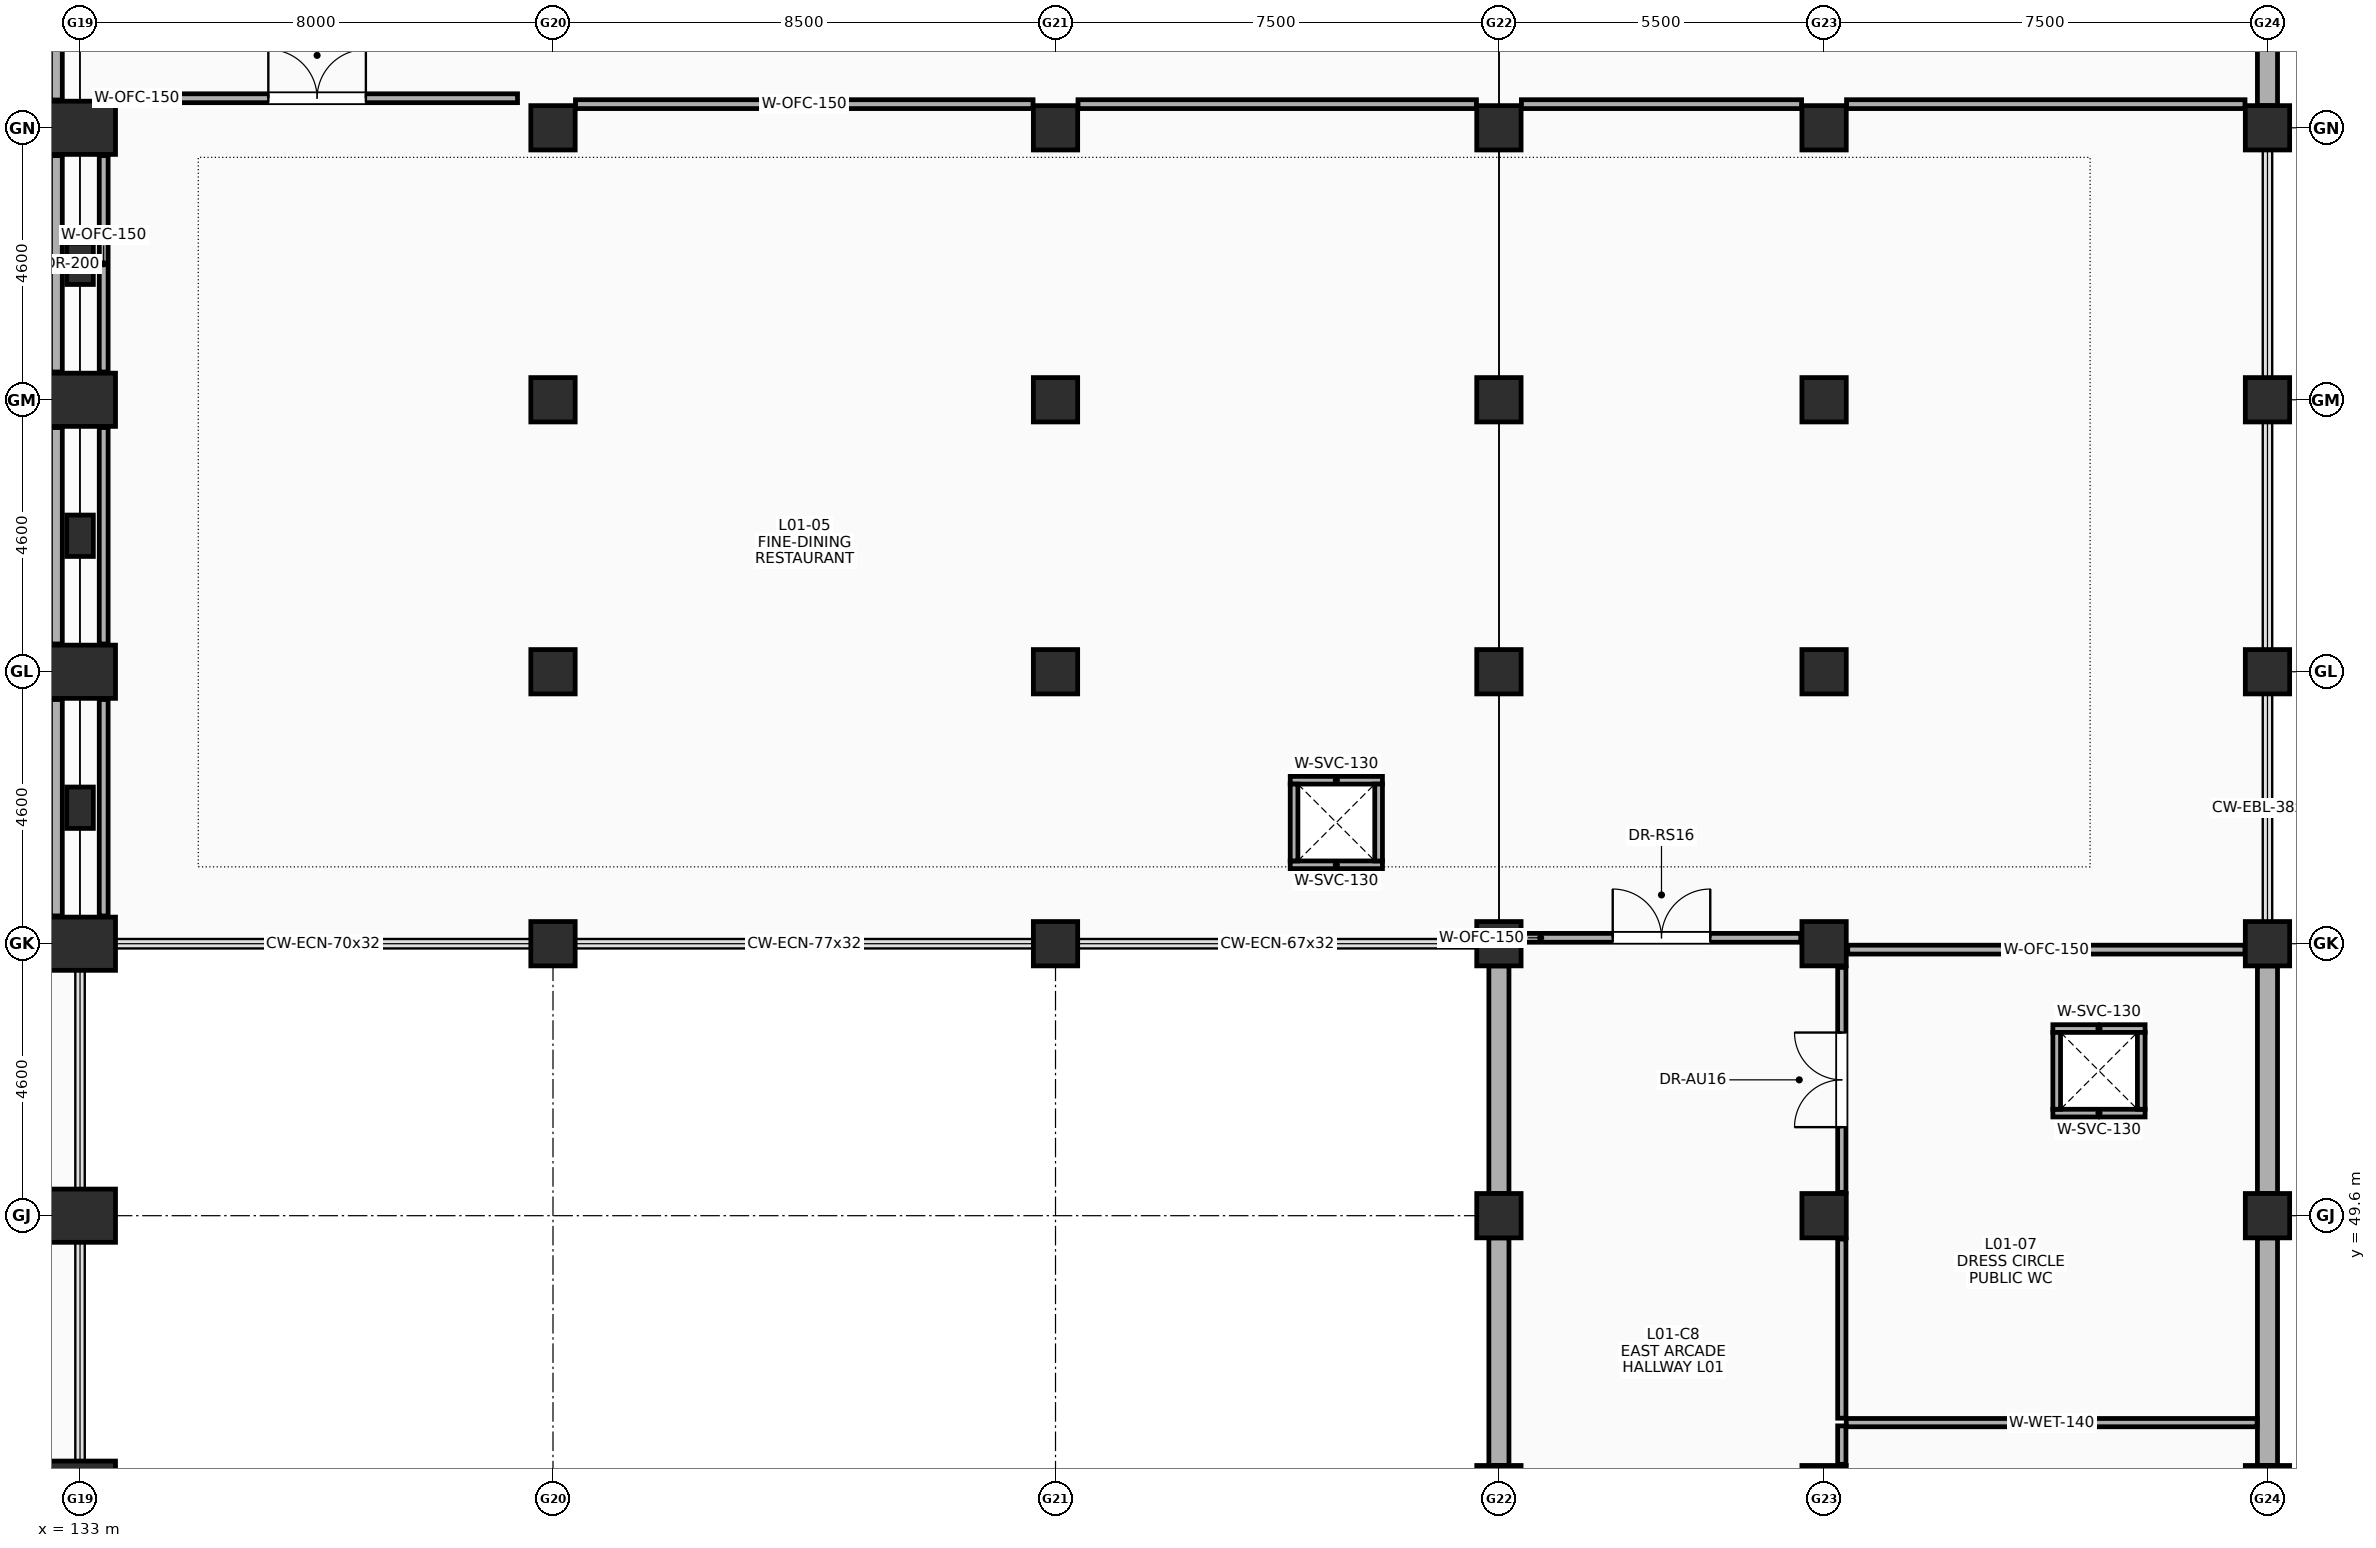
"""IFC4 building model, lengths in metres.
Left out: names, types, materials, properties, quantities, classifications, styles, units other than length and angle.
Written with IfcOpenShell. Run it as: python <this file> out.ifc"""

import sys

from ifc_helpers import new_model, si_unit, direction, frame, frame_2d, origin, origin_2d, place, context, subcontext, project, spatial, rectangle, extrude, element, fill, save


model = new_model("IFC4")
c1 = context("Model", 3, precision=1e-05, world=origin(), true_north=direction((0.0, 1.0)))
c2 = subcontext(c1, "Body", "Model", "MODEL_VIEW")
j1 = project(units=[si_unit("LENGTHUNIT", "METRE"), si_unit("PLANEANGLEUNIT", "RADIAN")], contexts=[c1])
p1 = place(None, origin())
s1 = spatial("IfcSite", under=j1, at=p1, CompositionType="ELEMENT")
p2 = place(p1, origin())
s2 = spatial("IfcBuilding", under=s1, at=p2, CompositionType="ELEMENT")
p3 = place(p2, frame((0.0, 0.0, 5.4)))
s3 = spatial("IfcBuildingStorey", under=s2, at=p3, CompositionType="ELEMENT", Elevation=5.4)
for number, where, z_axis, x_axis in (
    (1, (133.0, 45.0, 0.0), (0.0, 0.0, 1.0), (1.0, 0.0, 0.0)),
    (2, (133.0, 49.6, 0.0), (0.0, 0.0, 1.0), (1.0, 0.0, 0.0)),
    (3, (133.0, 54.2, 0.0), (0.0, 0.0, 1.0), (1.0, 0.0, 0.0)),
    (4, (133.0, 58.8, 0.0), (0.0, 0.0, 1.0), (1.0, 0.0, 0.0)),
    (5, (133.0, 63.4, 0.0), (0.0, 0.0, 1.0), (1.0, 0.0, 0.0)),
    (6, (133.0, 68.0, 0.0), (0.0, 0.0, 1.0), (1.0, 0.0, 0.0)),
):
    element("IfcColumn", number, at=place(p3, frame(where, z_axis=z_axis, x_axis=x_axis)), inside=s3, PredefinedType="COLUMN", context=c2, shape_type="SweptSolid", body=[
        extrude(rectangle(XDim=1.2, YDim=0.9, at=origin_2d()), origin(), (0.0, 0.0, 1.0), 4.4),
    ])
for number, where, z_axis, x_axis in (
    (7, (141.0, 54.2, 0.0), (0.0, 0.0, 1.0), (1.0, 0.0, 0.0)),
    (8, (141.0, 58.8, 0.0), (0.0, 0.0, 1.0), (1.0, 0.0, 0.0)),
    (9, (141.0, 63.4, 0.0), (0.0, 0.0, 1.0), (1.0, 0.0, 0.0)),
    (10, (141.0, 68.0, 0.0), (0.0, 0.0, 1.0), (1.0, 0.0, 0.0)),
    (11, (149.5, 54.2, 0.0), (0.0, 0.0, 1.0), (1.0, 0.0, 0.0)),
    (12, (149.5, 58.8, 0.0), (0.0, 0.0, 1.0), (1.0, 0.0, 0.0)),
    (13, (149.5, 63.4, 0.0), (0.0, 0.0, 1.0), (1.0, 0.0, 0.0)),
    (14, (149.5, 68.0, 0.0), (0.0, 0.0, 1.0), (1.0, 0.0, 0.0)),
    (15, (157.0, 45.0, 0.0), (0.0, 0.0, 1.0), (1.0, 0.0, 0.0)),
    (16, (157.0, 49.6, 0.0), (0.0, 0.0, 1.0), (1.0, 0.0, 0.0)),
    (17, (157.0, 54.2, 0.0), (0.0, 0.0, 1.0), (1.0, 0.0, 0.0)),
    (18, (157.0, 58.8, 0.0), (0.0, 0.0, 1.0), (1.0, 0.0, 0.0)),
    (19, (157.0, 63.4, 0.0), (0.0, 0.0, 1.0), (1.0, 0.0, 0.0)),
    (20, (157.0, 68.0, 0.0), (0.0, 0.0, 1.0), (1.0, 0.0, 0.0)),
    (21, (162.5, 45.0, 0.0), (0.0, 0.0, 1.0), (1.0, 0.0, 0.0)),
    (22, (162.5, 49.6, 0.0), (0.0, 0.0, 1.0), (1.0, 0.0, 0.0)),
    (23, (162.5, 54.2, 0.0), (0.0, 0.0, 1.0), (1.0, 0.0, 0.0)),
    (24, (162.5, 58.8, 0.0), (0.0, 0.0, 1.0), (1.0, 0.0, 0.0)),
    (25, (162.5, 63.4, 0.0), (0.0, 0.0, 1.0), (1.0, 0.0, 0.0)),
    (26, (162.5, 68.0, 0.0), (0.0, 0.0, 1.0), (1.0, 0.0, 0.0)),
    (27, (170.0, 45.0, 0.0), (0.0, 0.0, 1.0), (1.0, 0.0, 0.0)),
    (28, (170.0, 49.6, 0.0), (0.0, 0.0, 1.0), (1.0, 0.0, 0.0)),
    (29, (170.0, 54.2, 0.0), (0.0, 0.0, 1.0), (1.0, 0.0, 0.0)),
    (30, (170.0, 58.8, 0.0), (0.0, 0.0, 1.0), (1.0, 0.0, 0.0)),
    (31, (170.0, 63.4, 0.0), (0.0, 0.0, 1.0), (1.0, 0.0, 0.0)),
    (32, (170.0, 68.0, 0.0), (0.0, 0.0, 1.0), (1.0, 0.0, 0.0)),
):
    element("IfcColumn", number, at=place(p3, frame(where, z_axis=z_axis, x_axis=x_axis)), inside=s3, PredefinedType="COLUMN", context=c2, shape_type="SweptSolid", body=[
        extrude(rectangle(XDim=0.75, YDim=0.75, at=origin_2d()), origin(), (0.0, 0.0, 1.0), 4.4),
    ])
for number, where, z_axis, x_axis in (
    (33, (133.0, 56.5, 0.0), (0.0, 0.0, 1.0), (1.0, 0.0, 0.0)),
    (34, (133.0, 61.1, 0.0), (0.0, 0.0, 1.0), (1.0, 0.0, 0.0)),
    (35, (133.0, 65.7, 0.0), (0.0, 0.0, 1.0), (1.0, 0.0, 0.0)),
):
    element("IfcColumn", number, at=place(p3, frame(where, z_axis=z_axis, x_axis=x_axis)), inside=s3, PredefinedType="PILASTER", context=c2, shape_type="SweptSolid", body=[
        extrude(rectangle(XDim=0.45, YDim=0.7, at=origin_2d()), origin(), (0.0, 0.0, 1.0), 4.4),
    ])
p4 = place(p3, frame((170.0, 45.375, 0.0), z_axis=(0.0, 0.0, 1.0), x_axis=(0.0, 1.0, 0.0)))
e36 = element("IfcWall", 36, at=p4, inside=s3, PredefinedType="SOLIDWALL", context=c2, shape_type="SweptSolid", body=[
    extrude(rectangle(XDim=3.85, YDim=0.34, at=frame_2d((1.925, 0.0))), origin(), (0.0, 0.0, 1.0), 3.2),
])
p5 = place(p3, frame((170.0, 49.975, 0.0), z_axis=(0.0, 0.0, 1.0), x_axis=(0.0, 1.0, 0.0)))
e37 = element("IfcWall", 37, at=p5, inside=s3, PredefinedType="SOLIDWALL", context=c2, shape_type="SweptSolid", body=[
    extrude(rectangle(XDim=3.85, YDim=0.34, at=frame_2d((1.925, 0.0))), origin(), (0.0, 0.0, 1.0), 3.2),
])
for number, where, z_axis, x_axis in (
    (38, (170.0, 68.375, 0.0), (0.0, 0.0, 1.0), (0.0, 1.0, 0.0)),
    (39, (157.0, 45.375, 0.0), (0.0, 0.0, 1.0), (0.0, 1.0, 0.0)),
):
    element("IfcWall", number, at=place(p3, frame(where, z_axis=z_axis, x_axis=x_axis)), inside=s3, PredefinedType="SOLIDWALL", context=c2, shape_type="SweptSolid", body=[
        extrude(rectangle(XDim=3.85, YDim=0.34, at=frame_2d((1.925, 0.0))), origin(), (0.0, 0.0, 1.0), 3.2),
    ])
p6 = place(p3, frame((157.0, 49.975, 0.0), z_axis=(0.0, 0.0, 1.0), x_axis=(0.0, 1.0, 0.0)))
e40 = element("IfcWall", 40, at=p6, inside=s3, PredefinedType="SOLIDWALL", context=c2, shape_type="SweptSolid", body=[
    extrude(rectangle(XDim=3.85, YDim=0.34, at=frame_2d((1.925, 0.0))), origin(), (0.0, 0.0, 1.0), 3.2),
])
for number, where, z_axis, x_axis in (
    (41, (166.37, 51.335, 0.0), (0.0, 0.0, 1.0), (1.0, 0.0, 0.0)),
    (42, (166.37, 52.765, 0.0), (0.0, 0.0, 1.0), (1.0, 0.0, 0.0)),
):
    element("IfcWall", number, at=place(p3, frame(where, z_axis=z_axis, x_axis=x_axis)), inside=s3, PredefinedType="PARTITIONING", context=c2, shape_type="SweptSolid", body=[
        extrude(rectangle(XDim=1.56, YDim=0.13, at=frame_2d((0.78, 0.0))), origin(), (0.0, 0.0, 1.0), 4.02),
    ])
for number, where, z_axis, x_axis in (
    (43, (166.435, 51.4, 0.0), (0.0, 0.0, 1.0), (0.0, 1.0, 0.0)),
    (44, (167.865, 51.4, 0.0), (0.0, 0.0, 1.0), (0.0, 1.0, 0.0)),
):
    element("IfcWall", number, at=place(p3, frame(where, z_axis=z_axis, x_axis=x_axis)), inside=s3, PredefinedType="PARTITIONING", context=c2, shape_type="SweptSolid", body=[
        extrude(rectangle(XDim=1.3, YDim=0.13, at=frame_2d((0.65, 0.0))), origin(), (0.0, 0.0, 1.0), 4.02),
    ])
for number, where, z_axis, x_axis in (
    (45, (153.47, 55.535, 0.0), (0.0, 0.0, 1.0), (1.0, 0.0, 0.0)),
    (46, (153.47, 56.965, 0.0), (0.0, 0.0, 1.0), (1.0, 0.0, 0.0)),
):
    element("IfcWall", number, at=place(p3, frame(where, z_axis=z_axis, x_axis=x_axis)), inside=s3, PredefinedType="PARTITIONING", context=c2, shape_type="SweptSolid", body=[
        extrude(rectangle(XDim=1.56, YDim=0.13, at=frame_2d((0.78, 0.0))), origin(), (0.0, 0.0, 1.0), 4.02),
    ])
for number, where, z_axis, x_axis in (
    (47, (153.535, 55.6, 0.0), (0.0, 0.0, 1.0), (0.0, 1.0, 0.0)),
    (48, (154.965, 55.6, 0.0), (0.0, 0.0, 1.0), (0.0, 1.0, 0.0)),
):
    element("IfcWall", number, at=place(p3, frame(where, z_axis=z_axis, x_axis=x_axis)), inside=s3, PredefinedType="PARTITIONING", context=c2, shape_type="SweptSolid", body=[
        extrude(rectangle(XDim=1.3, YDim=0.13, at=frame_2d((0.65, 0.0))), origin(), (0.0, 0.0, 1.0), 4.02),
    ])
p7 = place(p3, frame((162.9, 54.1, 0.0), z_axis=(0.0, 0.0, 1.0), x_axis=(1.0, 0.0, 0.0)))
e49 = element("IfcWall", 49, at=p7, inside=s3, PredefinedType="PARTITIONING", context=c2, shape_type="SweptSolid", body=[
    extrude(rectangle(XDim=6.72, YDim=0.15, at=frame_2d((3.36, 0.0))), origin(), (0.0, 0.0, 1.0), 3.33),
])
p8 = place(p3, frame((133.605, 68.5, 0.0), z_axis=(0.0, 0.0, 1.0), x_axis=(1.0, 0.0, 0.0)))
e50 = element("IfcWall", 50, at=p8, inside=s3, PredefinedType="PARTITIONING", context=c2, shape_type="SweptSolid", body=[
    extrude(rectangle(XDim=6.795, YDim=0.15, at=frame_2d((3.397, 0.0))), origin(), (0.0, 0.0, 1.0), 4.02),
])
p9 = place(p8, frame((2.58, 0.0, 0.0)))
e51 = element("IfcOpeningElement", 51, at=p9, cuts=e50, PredefinedType="OPENING", context=c2, shape_type="SweptSolid", body=[
    extrude(rectangle(XDim=1.65, YDim=2.25, at=frame_2d((0.825, 1.125))), frame((0.0, 0.085, 0.0), z_axis=(0.0, -1.0, 0.0), x_axis=(1.0, 0.0, 0.0)), (0.0, 0.0, 1.0), 0.17),
])
p10 = place(p3, frame((157.395, 54.3, 0.0), z_axis=(0.0, 0.0, 1.0), x_axis=(1.0, 0.0, 0.0)))
e52 = element("IfcWall", 52, at=p10, inside=s3, PredefinedType="PARTITIONING", context=c2, shape_type="SweptSolid", body=[
    extrude(rectangle(XDim=4.71, YDim=0.15, at=frame_2d((2.355, 0.0))), origin(), (0.0, 0.0, 1.0), 3.53),
])
p11 = place(p10, frame((1.53, 0.0, 0.0)))
e53 = element("IfcOpeningElement", 53, at=p11, cuts=e52, PredefinedType="OPENING", context=c2, shape_type="SweptSolid", body=[
    extrude(rectangle(XDim=1.65, YDim=2.25, at=frame_2d((0.825, 1.125))), frame((0.0, 0.085, 0.0), z_axis=(0.0, -1.0, 0.0), x_axis=(1.0, 0.0, 0.0)), (0.0, 0.0, 1.0), 0.17),
])
p12 = place(p3, frame((162.875, 46.1, 0.0), z_axis=(0.0, 0.0, 1.0), x_axis=(1.0, 0.0, 0.0)))
e54 = element("IfcWall", 54, at=p12, inside=s3, PredefinedType="PARTITIONING", context=c2, shape_type="SweptSolid", body=[
    extrude(rectangle(XDim=6.95, YDim=0.14, at=frame_2d((3.475, 0.0))), origin(), (0.0, 0.0, 1.0), 3.53),
])
p13 = place(p3, frame((162.8, 49.995, 0.0), z_axis=(0.0, 0.0, 1.0), x_axis=(0.0, 1.0, 0.0)))
e55 = element("IfcWall", 55, at=p13, inside=s3, PredefinedType="PARTITIONING", context=c2, shape_type="SweptSolid", body=[
    extrude(rectangle(XDim=3.805, YDim=0.14, at=frame_2d((1.902, 0.0))), origin(), (0.0, 0.0, 1.0), 3.53),
])
p14 = place(p13, frame((1.103, 0.0, 0.0)))
e56 = element("IfcOpeningElement", 56, at=p14, cuts=e55, PredefinedType="OPENING", context=c2, shape_type="SweptSolid", body=[
    extrude(rectangle(XDim=1.6, YDim=2.25, at=frame_2d((0.8, 1.125))), frame((0.0, 0.08, 0.0), z_axis=(0.0, -1.0, 0.0), x_axis=(1.0, 0.0, 0.0)), (0.0, 0.0, 1.0), 0.16),
])
p15 = place(p3, frame((162.8, 46.175, 0.0), z_axis=(0.0, 0.0, 1.0), x_axis=(0.0, 1.0, 0.0)))
e57 = element("IfcWall", 57, at=p15, inside=s3, PredefinedType="PARTITIONING", context=c2, shape_type="SweptSolid", body=[
    extrude(rectangle(XDim=3.03, YDim=0.14, at=frame_2d((1.515, 0.0))), origin(), (0.0, 0.0, 1.0), 4.02),
])
p16 = place(p3, frame((132.6, 54.67, 0.0), z_axis=(0.0, 0.0, 1.0), x_axis=(0.0, 1.0, 0.0)))
e58 = element("IfcWall", 58, at=p16, inside=s3, PredefinedType="PARTITIONING", context=c2, shape_type="SweptSolid", body=[
    extrude(rectangle(XDim=3.66, YDim=0.2, at=frame_2d((1.83, 0.0))), origin(), (0.0, 0.0, 1.0), 2.9),
])
p17 = place(p3, frame((132.6, 59.27, 0.0), z_axis=(0.0, 0.0, 1.0), x_axis=(0.0, 1.0, 0.0)))
e59 = element("IfcWall", 59, at=p17, inside=s3, PredefinedType="PARTITIONING", context=c2, shape_type="SweptSolid", body=[
    extrude(rectangle(XDim=3.66, YDim=0.2, at=frame_2d((1.83, 0.0))), origin(), (0.0, 0.0, 1.0), 2.9),
])
for number, where, z_axis, x_axis in (
    (60, (132.6, 63.87, 0.0), (0.0, 0.0, 1.0), (0.0, 1.0, 0.0)),
    (61, (132.6, 68.47, 0.0), (0.0, 0.0, 1.0), (0.0, 1.0, 0.0)),
):
    element("IfcWall", number, at=place(p3, frame(where, z_axis=z_axis, x_axis=x_axis)), inside=s3, PredefinedType="PARTITIONING", context=c2, shape_type="SweptSolid", body=[
        extrude(rectangle(XDim=3.66, YDim=0.2, at=frame_2d((1.83, 0.0))), origin(), (0.0, 0.0, 1.0), 4.02),
    ])
p18 = place(p3, frame((141.38, 68.4, 0.0), z_axis=(0.0, 0.0, 1.0), x_axis=(1.0, 0.0, 0.0)))
e62 = element("IfcWall", 62, at=p18, inside=s3, PredefinedType="PARTITIONING", context=c2, shape_type="SweptSolid", body=[
    extrude(rectangle(XDim=7.74, YDim=0.15, at=frame_2d((3.87, 0.0))), origin(), (0.0, 0.0, 1.0), 4.02),
])
p19 = place(p3, frame((149.88, 68.4, 0.0), z_axis=(0.0, 0.0, 1.0), x_axis=(1.0, 0.0, 0.0)))
e63 = element("IfcWall", 63, at=p19, inside=s3, PredefinedType="PARTITIONING", context=c2, shape_type="SweptSolid", body=[
    extrude(rectangle(XDim=6.74, YDim=0.15, at=frame_2d((3.37, 0.0))), origin(), (0.0, 0.0, 1.0), 4.02),
])
p20 = place(p3, frame((157.38, 68.4, 0.0), z_axis=(0.0, 0.0, 1.0), x_axis=(1.0, 0.0, 0.0)))
e64 = element("IfcWall", 64, at=p20, inside=s3, PredefinedType="PARTITIONING", context=c2, shape_type="SweptSolid", body=[
    extrude(rectangle(XDim=4.74, YDim=0.15, at=frame_2d((2.37, 0.0))), origin(), (0.0, 0.0, 1.0), 4.02),
])
p21 = place(p3, frame((162.88, 68.4, 0.0), z_axis=(0.0, 0.0, 1.0), x_axis=(1.0, 0.0, 0.0)))
e65 = element("IfcWall", 65, at=p21, inside=s3, PredefinedType="PARTITIONING", context=c2, shape_type="SweptSolid", body=[
    extrude(rectangle(XDim=6.74, YDim=0.15, at=frame_2d((3.37, 0.0))), origin(), (0.0, 0.0, 1.0), 4.02),
])
p22 = place(p3, frame((133.4, 54.67, 0.0), z_axis=(0.0, 0.0, 1.0), x_axis=(0.0, 1.0, 0.0)))
e66 = element("IfcWall", 66, at=p22, inside=s3, PredefinedType="PARTITIONING", context=c2, shape_type="SweptSolid", body=[
    extrude(rectangle(XDim=3.66, YDim=0.15, at=frame_2d((1.83, 0.0))), origin(), (0.0, 0.0, 1.0), 4.02),
])
for number, where, z_axis, x_axis in (
    (67, (133.4, 59.27, 0.0), (0.0, 0.0, 1.0), (0.0, 1.0, 0.0)),
    (68, (133.4, 63.87, 0.0), (0.0, 0.0, 1.0), (0.0, 1.0, 0.0)),
):
    element("IfcWall", number, at=place(p3, frame(where, z_axis=z_axis, x_axis=x_axis)), inside=s3, PredefinedType="PARTITIONING", context=c2, shape_type="SweptSolid", body=[
        extrude(rectangle(XDim=3.66, YDim=0.15, at=frame_2d((1.83, 0.0))), origin(), (0.0, 0.0, 1.0), 4.02),
    ])
p23 = place(p3, frame((162.8, 45.395, 0.0), z_axis=(0.0, 0.0, 1.0), x_axis=(0.0, 1.0, 0.0)))
e69 = element("IfcWall", 69, at=p23, inside=s3, PredefinedType="PARTITIONING", context=c2, shape_type="SweptSolid", body=[
    extrude(rectangle(XDim=0.65, YDim=0.14, at=frame_2d((0.325, 0.0))), origin(), (0.0, 0.0, 1.0), 4.02),
])
p24 = place(p9, origin())
e70 = element("IfcDoor", 70, at=p24, inside=s3, OperationType="DOUBLE_DOOR_SINGLE_SWING", PredefinedType="DOOR", context=c2, shape_type="SweptSolid", body=[
    extrude(rectangle(XDim=1.65, YDim=2.25, at=frame_2d((0.825, 1.125))), frame((0.0, 0.025, 0.0), z_axis=(0.0, -1.0, 0.0), x_axis=(1.0, 0.0, 0.0)), (0.0, 0.0, 1.0), 0.05),
])
fill(e51, e70)
p25 = place(p11, origin())
e71 = element("IfcDoor", 71, at=p25, inside=s3, OperationType="DOUBLE_DOOR_SINGLE_SWING", PredefinedType="DOOR", context=c2, shape_type="SweptSolid", body=[
    extrude(rectangle(XDim=1.65, YDim=2.25, at=frame_2d((0.825, 1.125))), frame((0.0, 0.025, 0.0), z_axis=(0.0, -1.0, 0.0), x_axis=(1.0, 0.0, 0.0)), (0.0, 0.0, 1.0), 0.05),
])
fill(e53, e71)
p26 = place(p14, origin())
e72 = element("IfcDoor", 72, at=p26, inside=s3, OperationType="DOUBLE_DOOR_SINGLE_SWING", PredefinedType="DOOR", context=c2, shape_type="SweptSolid", body=[
    extrude(rectangle(XDim=1.6, YDim=2.25, at=frame_2d((0.8, 1.125))), frame((0.0, 0.025, 0.0), z_axis=(0.0, -1.0, 0.0), x_axis=(1.0, 0.0, 0.0)), (0.0, 0.0, 1.0), 0.05),
])
fill(e56, e72)
save(model, sys.argv[1])
